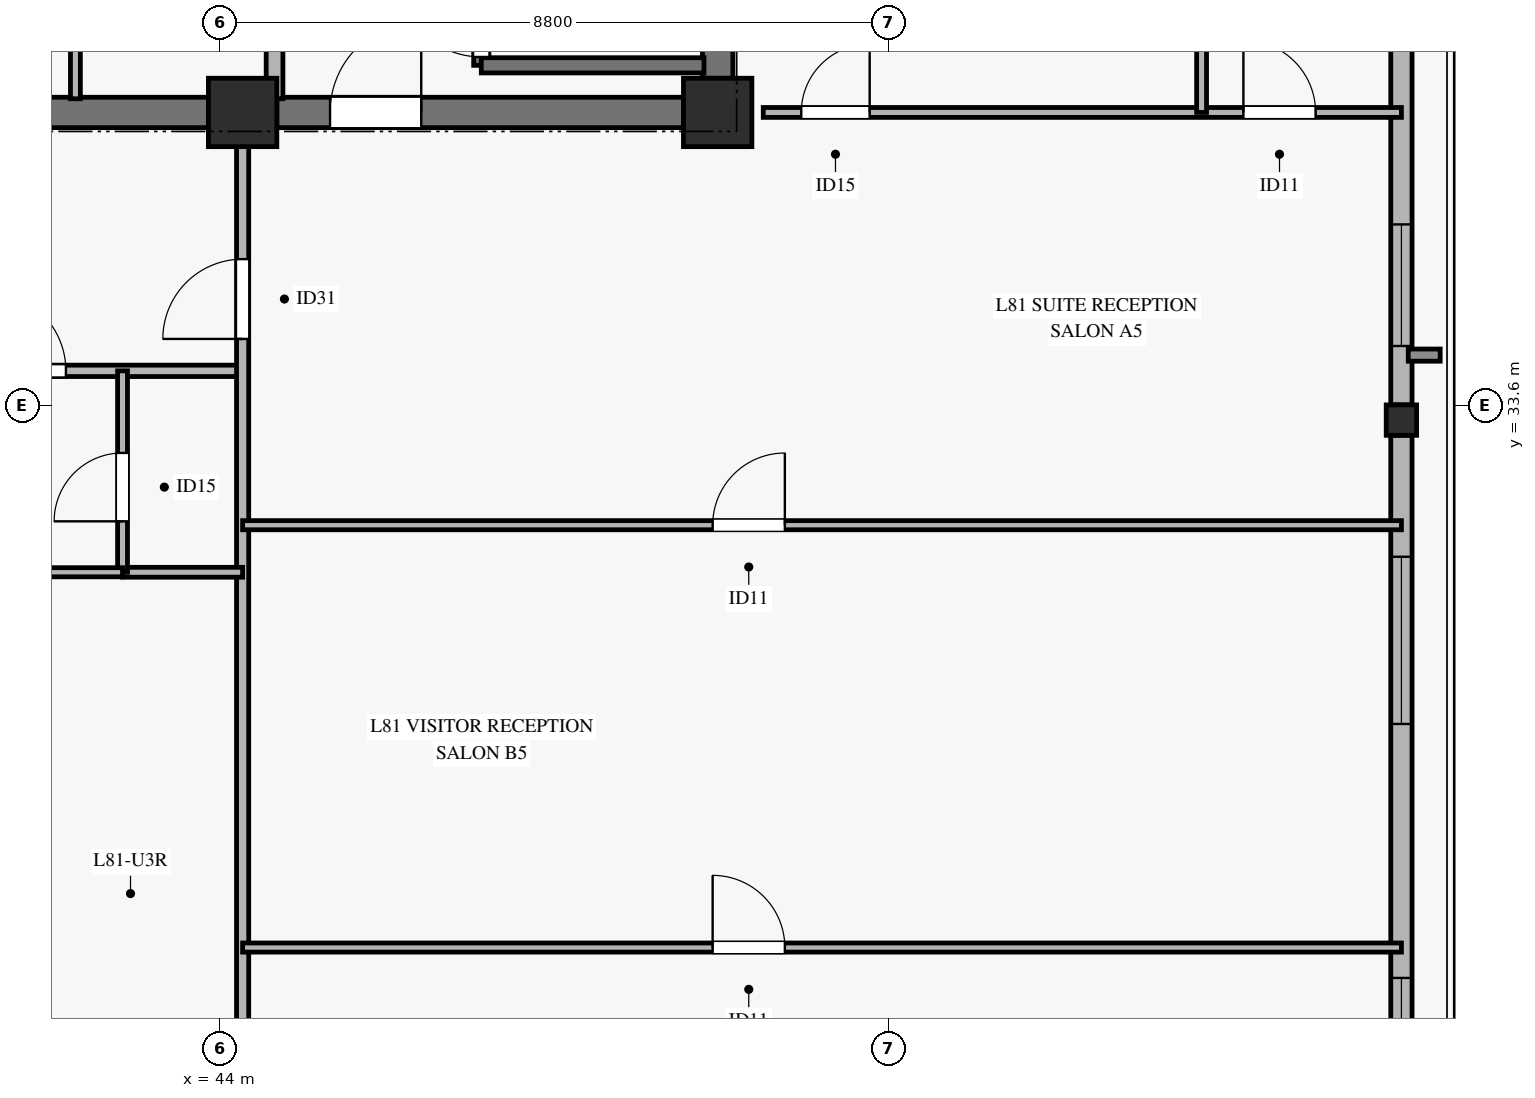
"""IFC4 building model, lengths in metres.
Left out: names, types, materials, properties, quantities, classifications, styles, units other than length and angle.
Written with IfcOpenShell. Run it as: python <this file> out.ifc"""

import sys

from ifc_helpers import new_model, si_unit, direction, frame, frame_2d, origin, origin_2d, place, context, subcontext, project, spatial, rectangle, hollow_rectangle, extrude, source, transform, mapped, element, fill, save


model = new_model("IFC4")
c1 = context("Model", 3, precision=1e-05, world=origin(), true_north=direction((0.0, 1.0)))
c2 = subcontext(c1, "Body", "Model", "MODEL_VIEW")
j1 = project(units=[si_unit("LENGTHUNIT", "METRE"), si_unit("PLANEANGLEUNIT", "RADIAN")], contexts=[c1])
p1 = place(None, origin())
s1 = spatial("IfcSite", under=j1, at=p1, CompositionType="ELEMENT")
p2 = place(p1, origin())
s2 = spatial("IfcBuilding", under=s1, at=p2, CompositionType="ELEMENT")
p3 = place(p2, frame((0.0, 0.0, 314.2)))
s3 = spatial("IfcBuildingStorey", under=s2, at=p3, CompositionType="ELEMENT", Elevation=314.2)
m1 = source(origin(), c2, "Body", "SweptSolid", [
    extrude(rectangle(XDim=0.9, YDim=0.9, at=origin_2d()), origin(), (0.0, 0.0, 1.0), 3.185),
])
for number, where, z_axis, x_axis in (
    (1, (44.3, 37.45, 0.0), (0.0, 0.0, 1.0), (1.0, 0.0, 0.0)),
    (2, (50.55, 37.45, 0.0), (0.0, 0.0, 1.0), (1.0, 0.0, 0.0)),
):
    element("IfcColumn", number, at=place(p3, frame(where, z_axis=z_axis, x_axis=x_axis)), inside=s3, PredefinedType="PILASTER", context=c2, shape_type="MappedRepresentation", body=[
        mapped(m1, transform((0.0, 0.0, 0.0), x_axis=(1.0, 0.0, 0.0), y_axis=(0.0, 1.0, 0.0), z_axis=(0.0, 0.0, 1.0), scale=1.0)),
    ])
p4 = place(p3, frame((36.05, 37.45, 0.0), z_axis=(0.0, 0.0, 1.0), x_axis=(1.0, 0.0, 0.0)))
e3 = element("IfcWall", 3, at=p4, inside=s3, PredefinedType="SHEAR", context=c2, shape_type="SweptSolid", body=[
    extrude(rectangle(XDim=7.8, YDim=0.4, at=frame_2d((3.9, 0.0))), origin(), (0.0, 0.0, 1.0), 3.185),
])
p5 = place(p3, frame((44.75, 37.45, 0.0), z_axis=(0.0, 0.0, 1.0), x_axis=(1.0, 0.0, 0.0)))
e4 = element("IfcWall", 4, at=p5, inside=s3, PredefinedType="SHEAR", context=c2, shape_type="SweptSolid", body=[
    extrude(rectangle(XDim=5.35, YDim=0.4, at=frame_2d((2.675, 0.0))), origin(), (0.0, 0.0, 1.0), 3.185),
])
p6 = place(p5, frame((0.7, 0.0, 0.0)))
e5 = element("IfcOpeningElement", 5, at=p6, cuts=e4, PredefinedType="OPENING", context=c2, shape_type="SweptSolid", body=[
    extrude(rectangle(XDim=1.2, YDim=2.15, at=frame_2d((0.6, 1.075))), frame((0.0, 0.21, 0.0), z_axis=(0.0, -1.0, 0.0), x_axis=(1.0, 0.0, 0.0)), (0.0, 0.0, 1.0), 0.42),
])
p7 = place(p3, frame((50.55, 37.9, 0.0), z_axis=(0.0, 0.0, 1.0), x_axis=(0.0, 1.0, 0.0)))
e6 = element("IfcWall", 6, at=p7, inside=s3, PredefinedType="SHEAR", context=c2, shape_type="SweptSolid", body=[
    extrude(rectangle(XDim=8.2, YDim=0.4, at=frame_2d((4.1, 0.0))), origin(), (0.0, 0.0, 1.0), 3.185),
])
m2 = source(origin(), c2, "Body", "SweptSolid", [
    extrude(hollow_rectangle(XDim=0.4, YDim=0.4, WallThickness=0.02, at=origin_2d()), origin(), (0.0, 0.0, 1.0), 3.185),
])
p8 = place(p3, frame((59.546, 33.402, 0.0), z_axis=(0.0, 0.0, 1.0), x_axis=(1.0, 0.0, 0.0)))
e7 = element("IfcColumn", 7, at=p8, inside=s3, PredefinedType="COLUMN", context=c2, shape_type="MappedRepresentation", body=[
    mapped(m2, transform((0.0, 0.0, 0.0), x_axis=(1.0, 0.0, 0.0), y_axis=(0.0, 1.0, 0.0), z_axis=(0.0, 0.0, 1.0), scale=1.0)),
])
p9 = place(p3, frame((59.546, 23.042, 0.0), z_axis=(0.0, 0.0, 1.0), x_axis=(0.0, 1.0, 0.0)))
e8 = element("IfcWall", 8, at=p9, inside=s3, PredefinedType="SOLIDWALL", context=c2, shape_type="SweptSolid", body=[
    extrude(rectangle(XDim=10.16, YDim=0.28, at=frame_2d((5.08, 0.0))), origin(), (0.0, 0.0, 1.0), 2.815),
])
p10 = place(p9, frame((0.82, 0.0, 0.45)))
e9 = element("IfcOpeningElement", 9, at=p10, cuts=e8, PredefinedType="OPENING", context=c2, shape_type="SweptSolid", body=[
    extrude(rectangle(XDim=2.2, YDim=2.1, at=frame_2d((1.1, 1.05))), frame((0.0, 0.15, 0.0), z_axis=(0.0, -1.0, 0.0), x_axis=(1.0, 0.0, 0.0)), (0.0, 0.0, 1.0), 0.3),
])
p11 = place(p9, frame((6.362, 0.0, 0.45)))
e10 = element("IfcOpeningElement", 10, at=p11, cuts=e8, PredefinedType="OPENING", context=c2, shape_type="SweptSolid", body=[
    extrude(rectangle(XDim=2.2, YDim=2.1, at=frame_2d((1.1, 1.05))), frame((0.0, 0.15, 0.0), z_axis=(0.0, -1.0, 0.0), x_axis=(1.0, 0.0, 0.0)), (0.0, 0.0, 1.0), 0.3),
])
p12 = place(p3, frame((59.546, 33.602, 0.0), z_axis=(0.0, 0.0, 1.0), x_axis=(0.0, 1.0, 0.0)))
e11 = element("IfcWall", 11, at=p12, inside=s3, PredefinedType="SOLIDWALL", context=c2, shape_type="SweptSolid", body=[
    extrude(rectangle(XDim=10.16, YDim=0.28, at=frame_2d((5.08, 0.0))), origin(), (0.0, 0.0, 1.0), 2.815),
])
p13 = place(p12, frame((0.775, 0.0, 0.45)))
e12 = element("IfcOpeningElement", 12, at=p13, cuts=e11, PredefinedType="OPENING", context=c2, shape_type="SweptSolid", body=[
    extrude(rectangle(XDim=1.6, YDim=2.0, at=frame_2d((0.8, 1.0))), frame((0.0, 0.15, 0.0), z_axis=(0.0, -1.0, 0.0), x_axis=(1.0, 0.0, 0.0)), (0.0, 0.0, 1.0), 0.3),
])
p14 = place(p3, frame((47.44, 38.07, 0.0), z_axis=(0.0, 0.0, 1.0), x_axis=(0.0, 1.0, 0.0)))
e13 = element("IfcWall", 13, at=p14, inside=s3, PredefinedType="SOLIDWALL", context=c2, shape_type="SweptSolid", body=[
    extrude(rectangle(XDim=7.25, YDim=0.2, at=frame_2d((3.625, 0.0))), origin(), (0.0, 0.0, 1.0), 3.4),
])
p15 = place(p14, frame((0.11, 0.0, 0.0)))
e14 = element("IfcOpeningElement", 14, at=p15, cuts=e13, PredefinedType="OPENING", context=c2, shape_type="SweptSolid", body=[
    extrude(rectangle(XDim=1.1, YDim=2.15, at=frame_2d((0.55, 1.075))), frame((0.0, 0.11, 0.0), z_axis=(0.0, -1.0, 0.0), x_axis=(1.0, 0.0, 0.0)), (0.0, 0.0, 1.0), 0.22),
])
p16 = place(p3, frame((47.44, 38.07, 0.0), z_axis=(0.0, 0.0, 1.0), x_axis=(1.0, 0.0, 0.0)))
e15 = element("IfcWall", 15, at=p16, inside=s3, PredefinedType="SOLIDWALL", context=c2, shape_type="SweptSolid", body=[
    extrude(rectangle(XDim=2.93, YDim=0.2, at=frame_2d((1.465, 0.0))), origin(), (0.0, 0.0, 1.0), 3.4),
])
p17 = place(p3, frame((44.72, 37.63, 0.0), z_axis=(0.0, 0.0, 1.0), x_axis=(0.0, 1.0, 0.0)))
e16 = element("IfcWall", 16, at=p17, inside=s3, PredefinedType="SOLIDWALL", context=c2, shape_type="SweptSolid", body=[
    extrude(rectangle(XDim=7.59, YDim=0.22, at=frame_2d((3.795, 0.0))), origin(), (0.0, 0.0, 1.0), 3.185),
])
p18 = place(p3, frame((42.1, 37.63, 0.0), z_axis=(0.0, 0.0, 1.0), x_axis=(0.0, 1.0, 0.0)))
e17 = element("IfcWall", 17, at=p18, inside=s3, PredefinedType="PARTITIONING", context=c2, shape_type="SweptSolid", body=[
    extrude(rectangle(XDim=8.74, YDim=0.13, at=frame_2d((4.37, 0.0))), origin(), (0.0, 0.0, 1.0), 3.185),
])
p19 = place(p18, frame((2.17, 0.0, 0.0)))
e18 = element("IfcOpeningElement", 18, at=p19, cuts=e17, PredefinedType="OPENING", context=c2, shape_type="SweptSolid", body=[
    extrude(rectangle(XDim=0.9, YDim=2.1, at=frame_2d((0.45, 1.05))), frame((0.0, 0.075, 0.0), z_axis=(0.0, -1.0, 0.0), x_axis=(1.0, 0.0, 0.0)), (0.0, 0.0, 1.0), 0.15),
])
p20 = place(p3, frame((23.4, 34.05, 0.0), z_axis=(0.0, 0.0, 1.0), x_axis=(1.0, 0.0, 0.0)))
e19 = element("IfcWall", 19, at=p20, inside=s3, PredefinedType="PARTITIONING", context=c2, shape_type="SweptSolid", body=[
    extrude(rectangle(XDim=20.9, YDim=0.15, at=frame_2d((10.45, 0.0))), origin(), (0.0, 0.0, 1.0), 2.47),
])
p21 = place(p20, frame((3.275, 0.0, 0.0)))
e20 = element("IfcOpeningElement", 20, at=p21, cuts=e19, PredefinedType="OPENING", context=c2, shape_type="SweptSolid", body=[
    extrude(rectangle(XDim=1.05, YDim=2.15, at=frame_2d((0.525, 1.075))), frame((0.0, 0.085, 0.0), z_axis=(0.0, -1.0, 0.0), x_axis=(1.0, 0.0, 0.0)), (0.0, 0.0, 1.0), 0.17),
])
p22 = place(p20, frame((10.775, 0.0, 0.0)))
e21 = element("IfcOpeningElement", 21, at=p22, cuts=e19, PredefinedType="OPENING", context=c2, shape_type="SweptSolid", body=[
    extrude(rectangle(XDim=1.05, YDim=2.15, at=frame_2d((0.525, 1.075))), frame((0.0, 0.085, 0.0), z_axis=(0.0, -1.0, 0.0), x_axis=(1.0, 0.0, 0.0)), (0.0, 0.0, 1.0), 0.17),
])
p23 = place(p20, frame((17.525, 0.0, 0.0)))
e22 = element("IfcOpeningElement", 22, at=p23, cuts=e19, PredefinedType="OPENING", context=c2, shape_type="SweptSolid", body=[
    extrude(rectangle(XDim=1.05, YDim=2.15, at=frame_2d((0.525, 1.075))), frame((0.0, 0.085, 0.0), z_axis=(0.0, -1.0, 0.0), x_axis=(1.0, 0.0, 0.0)), (0.0, 0.0, 1.0), 0.17),
])
p24 = place(p3, frame((44.3, 20.704, 0.0), z_axis=(0.0, 0.0, 1.0), x_axis=(0.0, 1.0, 0.0)))
e23 = element("IfcWall", 23, at=p24, inside=s3, PredefinedType="PARTITIONING", context=c2, shape_type="SweptSolid", body=[
    extrude(rectangle(XDim=16.746, YDim=0.16, at=frame_2d((8.373, 0.0))), origin(), (0.0, 0.0, 1.0), 2.47),
])
p25 = place(p24, frame((13.766, 0.0, 0.0)))
e24 = element("IfcOpeningElement", 24, at=p25, cuts=e23, PredefinedType="OPENING", context=c2, shape_type="SweptSolid", body=[
    extrude(rectangle(XDim=1.05, YDim=2.15, at=frame_2d((0.525, 1.075))), frame((0.0, 0.09, 0.0), z_axis=(0.0, -1.0, 0.0), x_axis=(1.0, 0.0, 0.0)), (0.0, 0.0, 1.0), 0.18),
])
p26 = place(p3, frame((42.72, 31.4, 0.0), z_axis=(0.0, 0.0, 1.0), x_axis=(1.0, 0.0, 0.0)))
e25 = element("IfcWall", 25, at=p26, inside=s3, PredefinedType="PARTITIONING", context=c2, shape_type="SweptSolid", body=[
    extrude(rectangle(XDim=1.58, YDim=0.13, at=frame_2d((0.79, 0.0))), origin(), (0.0, 0.0, 1.0), 2.47),
])
p27 = place(p3, frame((42.72, 31.4, 0.0), z_axis=(0.0, 0.0, 1.0), x_axis=(0.0, 1.0, 0.0)))
e26 = element("IfcWall", 26, at=p27, inside=s3, PredefinedType="PARTITIONING", context=c2, shape_type="SweptSolid", body=[
    extrude(rectangle(XDim=2.65, YDim=0.13, at=frame_2d((1.325, 0.0))), origin(), (0.0, 0.0, 1.0), 2.77),
])
p28 = place(p27, frame((0.67, 0.0, 0.0)))
e27 = element("IfcOpeningElement", 27, at=p28, cuts=e26, PredefinedType="OPENING", context=c2, shape_type="SweptSolid", body=[
    extrude(rectangle(XDim=0.9, YDim=2.1, at=frame_2d((0.45, 1.05))), frame((0.0, 0.075, 0.0), z_axis=(0.0, -1.0, 0.0), x_axis=(1.0, 0.0, 0.0)), (0.0, 0.0, 1.0), 0.15),
])
p29 = place(p3, frame((41.35, 31.4, 0.0), z_axis=(0.0, 0.0, 1.0), x_axis=(1.0, 0.0, 0.0)))
e28 = element("IfcWall", 28, at=p29, inside=s3, PredefinedType="PARTITIONING", context=c2, shape_type="SweptSolid", body=[
    extrude(rectangle(XDim=1.37, YDim=0.12, at=frame_2d((0.685, 0.0))), origin(), (0.0, 0.0, 1.0), 3.185),
])
p30 = place(p3, frame((44.3, 26.462, 0.0), z_axis=(0.0, 0.0, 1.0), x_axis=(1.0, 0.0, 0.0)))
e29 = element("IfcWall", 29, at=p30, inside=s3, PredefinedType="PARTITIONING", context=c2, shape_type="SweptSolid", body=[
    extrude(rectangle(XDim=15.246, YDim=0.12, at=frame_2d((7.623, 0.0))), origin(), (0.0, 0.0, 1.0), 2.47),
])
p31 = place(p30, frame((6.184, 0.0, 0.0)))
e30 = element("IfcOpeningElement", 30, at=p31, cuts=e29, PredefinedType="OPENING", context=c2, shape_type="SweptSolid", body=[
    extrude(rectangle(XDim=0.95, YDim=2.1, at=frame_2d((0.475, 1.05))), frame((0.0, 0.07, 0.0), z_axis=(0.0, -1.0, 0.0), x_axis=(1.0, 0.0, 0.0)), (0.0, 0.0, 1.0), 0.14),
])
p32 = place(p3, frame((44.3, 32.019, 0.0), z_axis=(0.0, 0.0, 1.0), x_axis=(1.0, 0.0, 0.0)))
e31 = element("IfcWall", 31, at=p32, inside=s3, PredefinedType="PARTITIONING", context=c2, shape_type="SweptSolid", body=[
    extrude(rectangle(XDim=15.246, YDim=0.12, at=frame_2d((7.623, 0.0))), origin(), (0.0, 0.0, 1.0), 2.47),
])
p33 = place(p32, frame((6.184, 0.0, 0.0)))
e32 = element("IfcOpeningElement", 32, at=p33, cuts=e31, PredefinedType="OPENING", context=c2, shape_type="SweptSolid", body=[
    extrude(rectangle(XDim=0.95, YDim=2.1, at=frame_2d((0.475, 1.05))), frame((0.0, 0.07, 0.0), z_axis=(0.0, -1.0, 0.0), x_axis=(1.0, 0.0, 0.0)), (0.0, 0.0, 1.0), 0.14),
])
p34 = place(p3, frame((51.15, 37.45, 0.0), z_axis=(0.0, 0.0, 1.0), x_axis=(1.0, 0.0, 0.0)))
e33 = element("IfcWall", 33, at=p34, inside=s3, PredefinedType="PARTITIONING", context=c2, shape_type="SweptSolid", body=[
    extrude(rectangle(XDim=8.396, YDim=0.13, at=frame_2d((4.198, 0.0))), origin(), (0.0, 0.0, 1.0), 2.82),
])
p35 = place(p34, frame((0.5, 0.0, 0.0)))
e34 = element("IfcOpeningElement", 34, at=p35, cuts=e33, PredefinedType="OPENING", context=c2, shape_type="SweptSolid", body=[
    extrude(rectangle(XDim=0.9, YDim=2.1, at=frame_2d((0.45, 1.05))), frame((0.0, 0.075, 0.0), z_axis=(0.0, -1.0, 0.0), x_axis=(1.0, 0.0, 0.0)), (0.0, 0.0, 1.0), 0.15),
])
p36 = place(p34, frame((6.317, 0.0, 0.0)))
e35 = element("IfcOpeningElement", 35, at=p36, cuts=e33, PredefinedType="OPENING", context=c2, shape_type="SweptSolid", body=[
    extrude(rectangle(XDim=0.95, YDim=2.1, at=frame_2d((0.475, 1.05))), frame((0.0, 0.075, 0.0), z_axis=(0.0, -1.0, 0.0), x_axis=(1.0, 0.0, 0.0)), (0.0, 0.0, 1.0), 0.15),
])
p37 = place(p3, frame((56.917, 37.45, 0.0), z_axis=(0.0, 0.0, 1.0), x_axis=(0.0, 1.0, 0.0)))
e36 = element("IfcWall", 36, at=p37, inside=s3, PredefinedType="PARTITIONING", context=c2, shape_type="SweptSolid", body=[
    extrude(rectangle(XDim=8.8, YDim=0.13, at=frame_2d((4.4, 0.0))), origin(), (0.0, 0.0, 1.0), 2.82),
])
m3 = source(origin(), c2, "Body", "SweptSolid", [
    extrude(rectangle(XDim=2.2, YDim=2.1, at=frame_2d((1.1, 1.05))), frame((0.0, 0.03, 0.0), z_axis=(0.0, -1.0, 0.0), x_axis=(1.0, 0.0, 0.0)), (0.0, 0.0, 1.0), 0.06),
])
p38 = place(p10, origin())
e37 = element("IfcWindow", 37, at=p38, inside=s3, PartitioningType="SINGLE_PANEL", PredefinedType="WINDOW", context=c2, shape_type="MappedRepresentation", body=[
    mapped(m3, transform((0.0, 0.0, 0.0), x_axis=(1.0, 0.0, 0.0), y_axis=(0.0, 1.0, 0.0), z_axis=(0.0, 0.0, 1.0), scale=1.0)),
])
fill(e9, e37)
p39 = place(p11, origin())
e38 = element("IfcWindow", 38, at=p39, inside=s3, PartitioningType="SINGLE_PANEL", PredefinedType="WINDOW", context=c2, shape_type="MappedRepresentation", body=[
    mapped(m3, transform((0.0, 0.0, 0.0), x_axis=(1.0, 0.0, 0.0), y_axis=(0.0, 1.0, 0.0), z_axis=(0.0, 0.0, 1.0), scale=1.0)),
])
fill(e10, e38)
m4 = source(origin(), c2, "Body", "SweptSolid", [
    extrude(rectangle(XDim=1.6, YDim=2.0, at=frame_2d((0.8, 1.0))), frame((0.0, 0.03, 0.0), z_axis=(0.0, -1.0, 0.0), x_axis=(1.0, 0.0, 0.0)), (0.0, 0.0, 1.0), 0.06),
])
p40 = place(p13, origin())
e39 = element("IfcWindow", 39, at=p40, inside=s3, PartitioningType="SINGLE_PANEL", PredefinedType="WINDOW", context=c2, shape_type="MappedRepresentation", body=[
    mapped(m4, transform((0.0, 0.0, 0.0), x_axis=(1.0, 0.0, 0.0), y_axis=(0.0, 1.0, 0.0), z_axis=(0.0, 0.0, 1.0), scale=1.0)),
])
fill(e12, e39)
m5 = source(origin(), c2, "Body", "SweptSolid", [
    extrude(rectangle(XDim=1.1, YDim=2.15, at=frame_2d((0.55, 1.075))), frame((0.0, 0.025, 0.0), z_axis=(0.0, -1.0, 0.0), x_axis=(1.0, 0.0, 0.0)), (0.0, 0.0, 1.0), 0.05),
])
p41 = place(p15, origin())
e40 = element("IfcDoor", 40, at=p41, inside=s3, OperationType="SINGLE_SWING_RIGHT", PredefinedType="DOOR", context=c2, shape_type="MappedRepresentation", body=[
    mapped(m5, transform((0.0, 0.0, 0.0), x_axis=(1.0, 0.0, 0.0), y_axis=(0.0, 1.0, 0.0), z_axis=(0.0, 0.0, 1.0), scale=1.0)),
])
fill(e14, e40)
m6 = source(origin(), c2, "Body", "SweptSolid", [
    extrude(rectangle(XDim=1.2, YDim=2.15, at=frame_2d((0.6, 1.075))), frame((0.0, 0.025, 0.0), z_axis=(0.0, -1.0, 0.0), x_axis=(1.0, 0.0, 0.0)), (0.0, 0.0, 1.0), 0.05),
])
p42 = place(p6, origin())
e41 = element("IfcDoor", 41, at=p42, inside=s3, OperationType="SINGLE_SWING_RIGHT", PredefinedType="DOOR", context=c2, shape_type="MappedRepresentation", body=[
    mapped(m6, transform((0.0, 0.0, 0.0), x_axis=(1.0, 0.0, 0.0), y_axis=(0.0, 1.0, 0.0), z_axis=(0.0, 0.0, 1.0), scale=1.0)),
])
fill(e5, e41)
m7 = source(origin(), c2, "Body", "SweptSolid", [
    extrude(rectangle(XDim=1.05, YDim=2.15, at=frame_2d((0.525, 1.075))), frame((0.0, 0.025, 0.0), z_axis=(0.0, -1.0, 0.0), x_axis=(1.0, 0.0, 0.0)), (0.0, 0.0, 1.0), 0.05),
])
p43 = place(p23, origin())
e42 = element("IfcDoor", 42, at=p43, inside=s3, OperationType="SINGLE_SWING_LEFT", PredefinedType="DOOR", context=c2, shape_type="MappedRepresentation", body=[
    mapped(m7, transform((0.0, 0.0, 0.0), x_axis=(1.0, 0.0, 0.0), y_axis=(0.0, 1.0, 0.0), z_axis=(0.0, 0.0, 1.0), scale=1.0)),
])
fill(e22, e42)
m8 = source(origin(), c2, "Body", "SweptSolid", [
    extrude(rectangle(XDim=0.9, YDim=2.1, at=frame_2d((0.45, 1.05))), frame((0.0, 0.025, 0.0), z_axis=(0.0, -1.0, 0.0), x_axis=(1.0, 0.0, 0.0)), (0.0, 0.0, 1.0), 0.05),
])
p44 = place(p28, origin())
e43 = element("IfcDoor", 43, at=p44, inside=s3, OperationType="SINGLE_SWING_LEFT", PredefinedType="DOOR", context=c2, shape_type="MappedRepresentation", body=[
    mapped(m8, transform((0.0, 0.0, 0.0), x_axis=(1.0, 0.0, 0.0), y_axis=(0.0, 1.0, 0.0), z_axis=(0.0, 0.0, 1.0), scale=1.0)),
])
fill(e27, e43)
p45 = place(p25, origin())
e44 = element("IfcDoor", 44, at=p45, inside=s3, OperationType="SINGLE_SWING_LEFT", PredefinedType="DOOR", context=c2, shape_type="MappedRepresentation", body=[
    mapped(m7, transform((0.0, 0.0, 0.0), x_axis=(1.0, 0.0, 0.0), y_axis=(0.0, 1.0, 0.0), z_axis=(0.0, 0.0, 1.0), scale=1.0)),
])
fill(e24, e44)
m9 = source(origin(), c2, "Body", "SweptSolid", [
    extrude(rectangle(XDim=0.95, YDim=2.1, at=frame_2d((0.475, 1.05))), frame((0.0, 0.025, 0.0), z_axis=(0.0, -1.0, 0.0), x_axis=(1.0, 0.0, 0.0)), (0.0, 0.0, 1.0), 0.05),
])
p46 = place(p33, origin())
e45 = element("IfcDoor", 45, at=p46, inside=s3, OperationType="SINGLE_SWING_RIGHT", PredefinedType="DOOR", context=c2, shape_type="MappedRepresentation", body=[
    mapped(m9, transform((0.0, 0.0, 0.0), x_axis=(1.0, 0.0, 0.0), y_axis=(0.0, 1.0, 0.0), z_axis=(0.0, 0.0, 1.0), scale=1.0)),
])
fill(e32, e45)
p47 = place(p31, origin())
e46 = element("IfcDoor", 46, at=p47, inside=s3, OperationType="SINGLE_SWING_LEFT", PredefinedType="DOOR", context=c2, shape_type="MappedRepresentation", body=[
    mapped(m9, transform((0.0, 0.0, 0.0), x_axis=(1.0, 0.0, 0.0), y_axis=(0.0, 1.0, 0.0), z_axis=(0.0, 0.0, 1.0), scale=1.0)),
])
fill(e30, e46)
p48 = place(p35, origin())
e47 = element("IfcDoor", 47, at=p48, inside=s3, OperationType="SINGLE_SWING_RIGHT", PredefinedType="DOOR", context=c2, shape_type="MappedRepresentation", body=[
    mapped(m8, transform((0.0, 0.0, 0.0), x_axis=(1.0, 0.0, 0.0), y_axis=(0.0, 1.0, 0.0), z_axis=(0.0, 0.0, 1.0), scale=1.0)),
])
fill(e34, e47)
p49 = place(p36, origin())
e48 = element("IfcDoor", 48, at=p49, inside=s3, OperationType="SINGLE_SWING_LEFT", PredefinedType="DOOR", context=c2, shape_type="MappedRepresentation", body=[
    mapped(m9, transform((0.0, 0.0, 0.0), x_axis=(1.0, 0.0, 0.0), y_axis=(0.0, 1.0, 0.0), z_axis=(0.0, 0.0, 1.0), scale=1.0)),
])
fill(e35, e48)
save(model, sys.argv[1])
